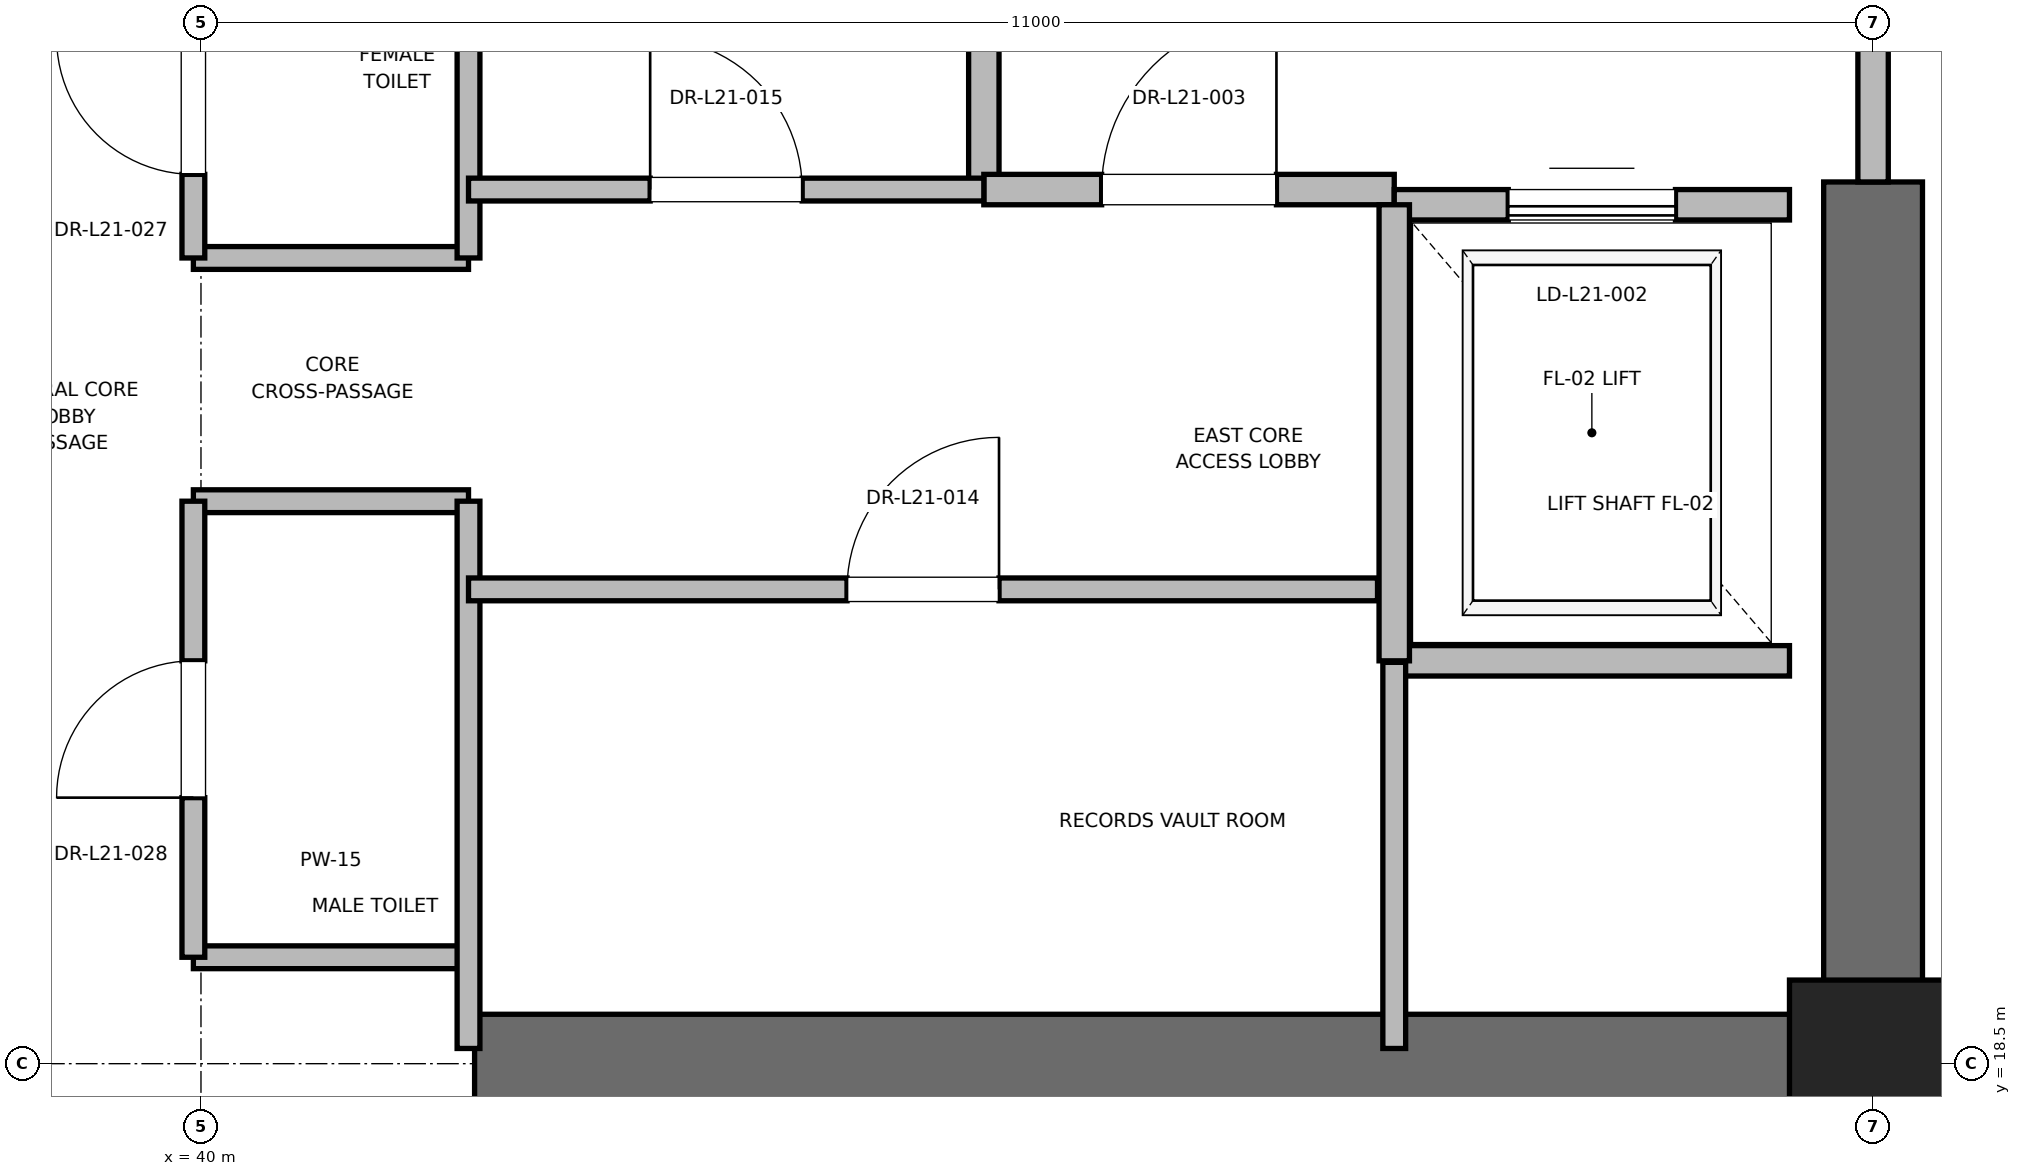
"""IFC4 building model, lengths in metres.
Left out: names, types, materials, properties, quantities, classifications, styles, units other than length and angle.
Written with IfcOpenShell. Run it as: python <this file> out.ifc"""

import sys

from ifc_helpers import new_model, si_unit, direction, frame, frame_2d, origin, origin_2d, place, context, subcontext, project, spatial, rectangle, extrude, element, fill, save


model = new_model("IFC4")
c1 = context("Model", 3, precision=1e-05, world=origin(), true_north=direction((0.0, 1.0)))
c2 = subcontext(c1, "Body", "Model", "MODEL_VIEW")
j1 = project(units=[si_unit("LENGTHUNIT", "METRE"), si_unit("PLANEANGLEUNIT", "RADIAN")], contexts=[c1])
p1 = place(None, origin())
s1 = spatial("IfcSite", under=j1, at=p1, CompositionType="ELEMENT")
p2 = place(p1, origin())
s2 = spatial("IfcBuilding", under=s1, at=p2, CompositionType="ELEMENT")
p3 = place(p2, frame((0.0, 0.0, 91.6)))
s3 = spatial("IfcBuildingStorey", under=s2, at=p3, CompositionType="ELEMENT", Elevation=91.6)
p4 = place(p3, frame((51.0, 18.5, 0.0), z_axis=(0.0, 0.0, 1.0), x_axis=(1.0, 0.0, 0.0)))
e1 = element("IfcColumn", 1, at=p4, inside=s3, PredefinedType="PILASTER", context=c2, shape_type="SweptSolid", body=[
    extrude(rectangle(XDim=1.1, YDim=1.1, at=origin_2d()), origin(), (0.0, 0.0, 1.0), 4.0),
])
p5 = place(p3, frame((41.8, 18.5, 0.0), z_axis=(0.0, 0.0, 1.0), x_axis=(1.0, 0.0, 0.0)))
e2 = element("IfcWall", 2, at=p5, inside=s3, PredefinedType="SHEAR", context=c2, shape_type="SweptSolid", body=[
    extrude(rectangle(XDim=9.2, YDim=0.65, at=frame_2d((4.6, 0.0))), origin(), (0.0, 0.0, 1.0), 3.76),
])
p6 = place(p3, frame((51.0, 18.5, 0.0), z_axis=(0.0, 0.0, 1.0), x_axis=(0.0, 1.0, 0.0)))
e3 = element("IfcWall", 3, at=p6, inside=s3, PredefinedType="SHEAR", context=c2, shape_type="SweptSolid", body=[
    extrude(rectangle(XDim=5.8, YDim=0.65, at=frame_2d((2.9, 0.0))), origin(), (0.0, 0.0, 1.0), 3.76),
])
p7 = place(p3, frame((45.15, 24.25, 0.0), z_axis=(0.0, 0.0, 1.0), x_axis=(0.0, 1.0, 0.0)))
e4 = element("IfcWall", 4, at=p7, inside=s3, PredefinedType="PARTITIONING", context=c2, shape_type="SweptSolid", body=[
    extrude(rectangle(XDim=3.37, YDim=0.2, at=frame_2d((1.685, 0.0))), origin(), (0.0, 0.0, 1.0), 3.76),
])
p8 = place(p3, frame((45.15, 24.25, 0.0), z_axis=(0.0, 0.0, 1.0), x_axis=(1.0, 0.0, 0.0)))
e5 = element("IfcWall", 5, at=p8, inside=s3, PredefinedType="PARTITIONING", context=c2, shape_type="SweptSolid", body=[
    extrude(rectangle(XDim=2.7, YDim=0.2, at=frame_2d((1.35, 0.0))), origin(), (0.0, 0.0, 1.0), 3.76),
])
p9 = place(p8, frame((0.775, 0.0, 0.0)))
e6 = element("IfcOpeningElement", 6, at=p9, cuts=e5, PredefinedType="OPENING", context=c2, shape_type="SweptSolid", body=[
    extrude(rectangle(XDim=1.15, YDim=2.2, at=frame_2d((0.575, 1.1))), frame((0.0, 0.1, 0.0), z_axis=(0.0, -1.0, 0.0), x_axis=(1.0, 0.0, 0.0)), (0.0, 0.0, 1.0), 0.2),
])
p10 = place(p3, frame((51.0, 24.3, 0.0), z_axis=(0.0, 0.0, 1.0), x_axis=(0.0, 1.0, 0.0)))
e7 = element("IfcWall", 7, at=p10, inside=s3, PredefinedType="PARTITIONING", context=c2, shape_type="SweptSolid", body=[
    extrude(rectangle(XDim=3.4, YDim=0.2, at=frame_2d((1.7, 0.0))), origin(), (0.0, 0.0, 1.0), 2.54),
])
p11 = place(p10, frame((1.125, 0.0, 0.0)))
e8 = element("IfcOpeningElement", 8, at=p11, cuts=e7, PredefinedType="OPENING", context=c2, shape_type="SweptSolid", body=[
    extrude(rectangle(XDim=1.15, YDim=2.2, at=frame_2d((0.575, 1.1))), frame((0.0, 0.1, 0.0), z_axis=(0.0, -1.0, 0.0), x_axis=(1.0, 0.0, 0.0)), (0.0, 0.0, 1.0), 0.2),
])
p12 = place(p3, frame((47.85, 21.15, 0.0), z_axis=(0.0, 0.0, 1.0), x_axis=(1.0, 0.0, 0.0)))
e9 = element("IfcWall", 9, at=p12, inside=s3, PredefinedType="SOLIDWALL", context=c2, shape_type="SweptSolid", body=[
    extrude(rectangle(XDim=2.6, YDim=0.2, at=frame_2d((1.3, 0.0))), origin(), (0.0, 0.0, 1.0), 3.76),
])
p13 = place(p3, frame((50.45, 24.15, 0.0), z_axis=(0.0, 0.0, 1.0), x_axis=(-1.0, 0.0, 0.0)))
e10 = element("IfcWall", 10, at=p13, inside=s3, PredefinedType="SOLIDWALL", context=c2, shape_type="SweptSolid", body=[
    extrude(rectangle(XDim=2.6, YDim=0.2, at=frame_2d((1.3, 0.0))), origin(), (0.0, 0.0, 1.0), 2.54),
])
p14 = place(p13, frame((0.75, 0.0, 0.0)))
e11 = element("IfcOpeningElement", 11, at=p14, cuts=e10, PredefinedType="OPENING", context=c2, shape_type="SweptSolid", body=[
    extrude(rectangle(XDim=1.1, YDim=2.2, at=frame_2d((0.55, 1.1))), frame((0.0, 0.1, 0.0), z_axis=(0.0, -1.0, 0.0), x_axis=(1.0, 0.0, 0.0)), (0.0, 0.0, 1.0), 0.2),
])
p15 = place(p3, frame((47.85, 24.15, 0.0), z_axis=(0.0, 0.0, 1.0), x_axis=(0.0, -1.0, 0.0)))
e12 = element("IfcWall", 12, at=p15, inside=s3, PredefinedType="SOLIDWALL", context=c2, shape_type="SweptSolid", body=[
    extrude(rectangle(XDim=3.0, YDim=0.2, at=frame_2d((1.5, 0.0))), origin(), (0.0, 0.0, 1.0), 3.76),
])
for number, where, z_axis, x_axis in (
    (13, (39.95, 19.2, 0.0), (0.0, 0.0, 1.0), (1.0, 0.0, 0.0)),
    (14, (39.95, 22.2, 0.0), (0.0, 0.0, 1.0), (1.0, 0.0, 0.0)),
    (15, (39.95, 23.8, 0.0), (0.0, 0.0, 1.0), (1.0, 0.0, 0.0)),
):
    element("IfcWall", number, at=place(p3, frame(where, z_axis=z_axis, x_axis=x_axis)), inside=s3, PredefinedType="PARTITIONING", context=c2, shape_type="SweptSolid", body=[
        extrude(rectangle(XDim=1.81, YDim=0.15, at=frame_2d((0.905, 0.0))), origin(), (0.0, 0.0, 1.0), 2.85),
    ])
p16 = place(p3, frame((41.76, 18.6, 0.0), z_axis=(0.0, 0.0, 1.0), x_axis=(0.0, 1.0, 0.0)))
e16 = element("IfcWall", 16, at=p16, inside=s3, PredefinedType="PARTITIONING", context=c2, shape_type="SweptSolid", body=[
    extrude(rectangle(XDim=3.6, YDim=0.15, at=frame_2d((1.8, 0.0))), origin(), (0.0, 0.0, 1.0), 2.54),
])
p17 = place(p3, frame((41.76, 23.8, 0.0), z_axis=(0.0, 0.0, 1.0), x_axis=(0.0, 1.0, 0.0)))
e17 = element("IfcWall", 17, at=p17, inside=s3, PredefinedType="PARTITIONING", context=c2, shape_type="SweptSolid", body=[
    extrude(rectangle(XDim=4.0, YDim=0.15, at=frame_2d((2.0, 0.0))), origin(), (0.0, 0.0, 1.0), 2.85),
])
p18 = place(p3, frame((39.95, 19.2, 0.0), z_axis=(0.0, 0.0, 1.0), x_axis=(0.0, 1.0, 0.0)))
e18 = element("IfcWall", 18, at=p18, inside=s3, PredefinedType="PARTITIONING", context=c2, shape_type="SweptSolid", body=[
    extrude(rectangle(XDim=3.0, YDim=0.15, at=frame_2d((1.5, 0.0))), origin(), (0.0, 0.0, 1.0), 2.85),
])
p19 = place(p18, frame((1.05, 0.0, 0.0)))
e19 = element("IfcOpeningElement", 19, at=p19, cuts=e18, PredefinedType="OPENING", context=c2, shape_type="SweptSolid", body=[
    extrude(rectangle(XDim=0.9, YDim=2.1, at=frame_2d((0.45, 1.05))), frame((0.0, 0.075, 0.0), z_axis=(0.0, -1.0, 0.0), x_axis=(1.0, 0.0, 0.0)), (0.0, 0.0, 1.0), 0.15),
])
p20 = place(p3, frame((39.95, 23.8, 0.0), z_axis=(0.0, 0.0, 1.0), x_axis=(0.0, 1.0, 0.0)))
e20 = element("IfcWall", 20, at=p20, inside=s3, PredefinedType="PARTITIONING", context=c2, shape_type="SweptSolid", body=[
    extrude(rectangle(XDim=2.0, YDim=0.15, at=frame_2d((1.0, 0.0))), origin(), (0.0, 0.0, 1.0), 2.85),
])
p21 = place(p20, frame((0.55, 0.0, 0.0)))
e21 = element("IfcOpeningElement", 21, at=p21, cuts=e20, PredefinedType="OPENING", context=c2, shape_type="SweptSolid", body=[
    extrude(rectangle(XDim=0.9, YDim=2.1, at=frame_2d((0.45, 1.05))), frame((0.0, 0.075, 0.0), z_axis=(0.0, -1.0, 0.0), x_axis=(1.0, 0.0, 0.0)), (0.0, 0.0, 1.0), 0.15),
])
p22 = place(p3, frame((47.85, 18.6, 0.0), z_axis=(0.0, 0.0, 1.0), x_axis=(0.0, 1.0, 0.0)))
e22 = element("IfcWall", 22, at=p22, inside=s3, PredefinedType="PARTITIONING", context=c2, shape_type="SweptSolid", body=[
    extrude(rectangle(XDim=2.54, YDim=0.15, at=frame_2d((1.27, 0.0))), origin(), (0.0, 0.0, 1.0), 2.85),
])
p23 = place(p3, frame((41.76, 21.62, 0.0), z_axis=(0.0, 0.0, 1.0), x_axis=(1.0, 0.0, 0.0)))
e23 = element("IfcWall", 23, at=p23, inside=s3, PredefinedType="PARTITIONING", context=c2, shape_type="SweptSolid", body=[
    extrude(rectangle(XDim=5.98, YDim=0.15, at=frame_2d((2.99, 0.0))), origin(), (0.0, 0.0, 1.0), 2.85),
])
p24 = place(p23, frame((2.49, 0.0, 0.0)))
e24 = element("IfcOpeningElement", 24, at=p24, cuts=e23, PredefinedType="OPENING", context=c2, shape_type="SweptSolid", body=[
    extrude(rectangle(XDim=1.0, YDim=2.15, at=frame_2d((0.5, 1.075))), frame((0.0, 0.075, 0.0), z_axis=(0.0, -1.0, 0.0), x_axis=(1.0, 0.0, 0.0)), (0.0, 0.0, 1.0), 0.15),
])
p25 = place(p3, frame((41.76, 24.25, 0.0), z_axis=(0.0, 0.0, 1.0), x_axis=(1.0, 0.0, 0.0)))
e25 = element("IfcWall", 25, at=p25, inside=s3, PredefinedType="PARTITIONING", context=c2, shape_type="SweptSolid", body=[
    extrude(rectangle(XDim=3.39, YDim=0.15, at=frame_2d((1.695, 0.0))), origin(), (0.0, 0.0, 1.0), 2.85),
])
p26 = place(p25, frame((1.195, 0.0, 0.0)))
e26 = element("IfcOpeningElement", 26, at=p26, cuts=e25, PredefinedType="OPENING", context=c2, shape_type="SweptSolid", body=[
    extrude(rectangle(XDim=1.0, YDim=2.15, at=frame_2d((0.5, 1.075))), frame((0.0, 0.075, 0.0), z_axis=(0.0, -1.0, 0.0), x_axis=(1.0, 0.0, 0.0)), (0.0, 0.0, 1.0), 0.15),
])
p27 = place(p9, origin())
e27 = element("IfcDoor", 27, at=p27, inside=s3, OperationType="SINGLE_SWING_RIGHT", PredefinedType="DOOR", context=c2, shape_type="SweptSolid", body=[
    extrude(rectangle(XDim=1.15, YDim=2.2, at=frame_2d((0.575, 1.1))), frame((0.0, 0.025, 0.0), z_axis=(0.0, -1.0, 0.0), x_axis=(1.0, 0.0, 0.0)), (0.0, 0.0, 1.0), 0.05),
])
fill(e6, e27)
p28 = place(p14, origin())
e28 = element("IfcDoor", 28, at=p28, inside=s3, OperationType="SLIDING_TO_RIGHT", PredefinedType="DOOR", context=c2, shape_type="SweptSolid", body=[
    extrude(rectangle(XDim=1.1, YDim=2.2, at=frame_2d((0.55, 1.1))), frame((0.0, 0.025, 0.0), z_axis=(0.0, -1.0, 0.0), x_axis=(1.0, 0.0, 0.0)), (0.0, 0.0, 1.0), 0.05),
])
fill(e11, e28)
p29 = place(p19, origin())
e29 = element("IfcDoor", 29, at=p29, inside=s3, OperationType="SINGLE_SWING_LEFT", PredefinedType="DOOR", context=c2, shape_type="SweptSolid", body=[
    extrude(rectangle(XDim=0.9, YDim=2.1, at=frame_2d((0.45, 1.05))), frame((0.0, 0.025, 0.0), z_axis=(0.0, -1.0, 0.0), x_axis=(1.0, 0.0, 0.0)), (0.0, 0.0, 1.0), 0.05),
])
fill(e19, e29)
p30 = place(p21, origin())
e30 = element("IfcDoor", 30, at=p30, inside=s3, OperationType="SINGLE_SWING_RIGHT", PredefinedType="DOOR", context=c2, shape_type="SweptSolid", body=[
    extrude(rectangle(XDim=0.9, YDim=2.1, at=frame_2d((0.45, 1.05))), frame((0.0, 0.025, 0.0), z_axis=(0.0, -1.0, 0.0), x_axis=(1.0, 0.0, 0.0)), (0.0, 0.0, 1.0), 0.05),
])
fill(e21, e30)
p31 = place(p24, origin())
e31 = element("IfcDoor", 31, at=p31, inside=s3, OperationType="SINGLE_SWING_RIGHT", PredefinedType="DOOR", context=c2, shape_type="SweptSolid", body=[
    extrude(rectangle(XDim=1.0, YDim=2.15, at=frame_2d((0.5, 1.075))), frame((0.0, 0.025, 0.0), z_axis=(0.0, -1.0, 0.0), x_axis=(1.0, 0.0, 0.0)), (0.0, 0.0, 1.0), 0.05),
])
fill(e24, e31)
p32 = place(p26, origin())
e32 = element("IfcDoor", 32, at=p32, inside=s3, OperationType="SINGLE_SWING_LEFT", PredefinedType="DOOR", context=c2, shape_type="SweptSolid", body=[
    extrude(rectangle(XDim=1.0, YDim=2.15, at=frame_2d((0.5, 1.075))), frame((0.0, 0.025, 0.0), z_axis=(0.0, -1.0, 0.0), x_axis=(1.0, 0.0, 0.0)), (0.0, 0.0, 1.0), 0.05),
])
fill(e26, e32)
save(model, sys.argv[1])
